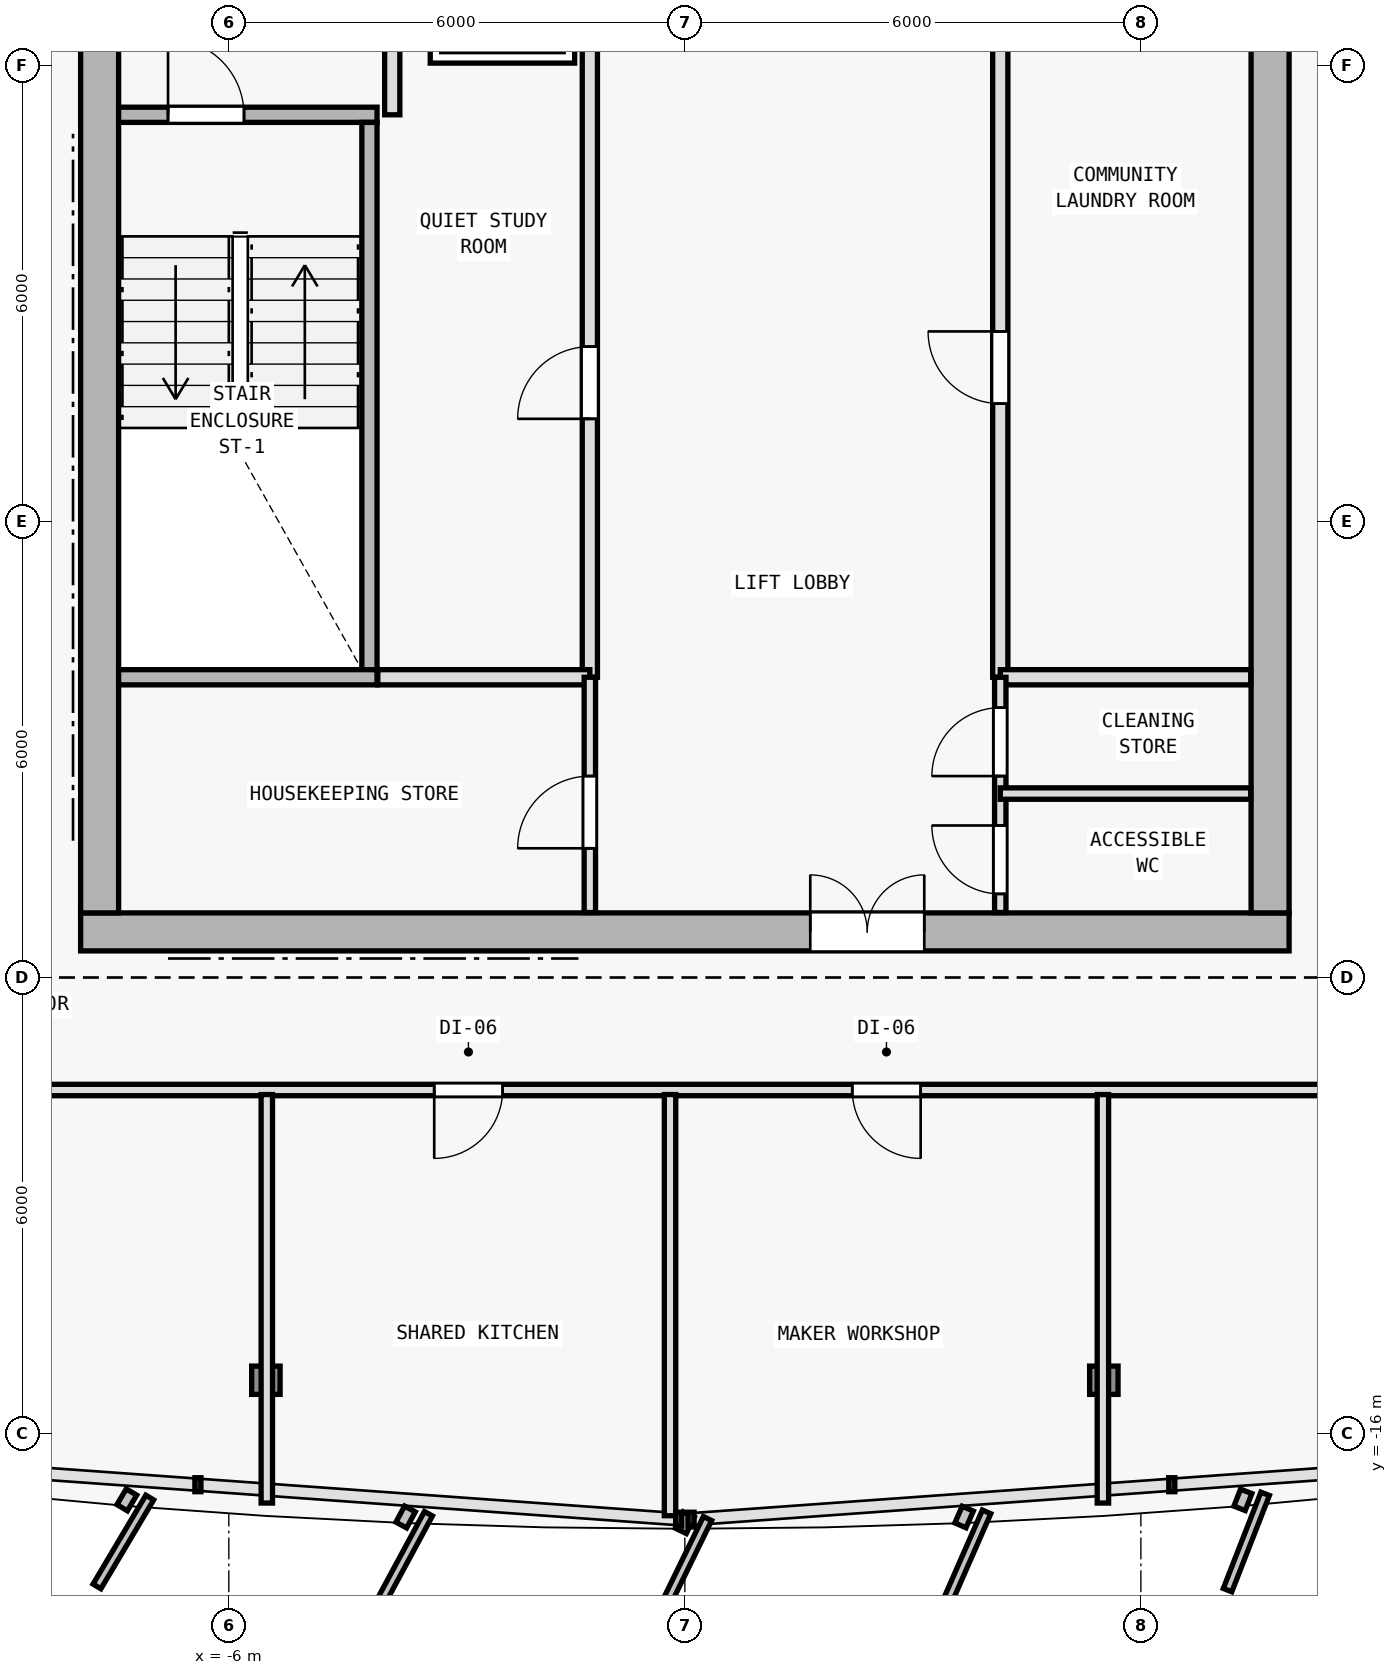
"""IFC4 building model, lengths in metres.
Left out: names, types, materials, properties, quantities, classifications, styles, units other than length and angle.
Written with IfcOpenShell. Run it as: python <this file> out.ifc"""

import sys

from ifc_helpers import new_model, si_unit, direction, frame, frame_2d, origin, origin_2d, place, context, subcontext, project, spatial, rectangle, i_section, extrude, element, fill, save


model = new_model("IFC4")
c1 = context("Model", 3, precision=1e-05, world=origin(), true_north=direction((0.0, 1.0)))
c2 = subcontext(c1, "Body", "Model", "MODEL_VIEW")
j1 = project(units=[si_unit("LENGTHUNIT", "METRE"), si_unit("PLANEANGLEUNIT", "RADIAN")], contexts=[c1])
p1 = place(None, origin())
s1 = spatial("IfcSite", under=j1, at=p1, CompositionType="ELEMENT")
p2 = place(p1, origin())
s2 = spatial("IfcBuilding", under=s1, at=p2, CompositionType="ELEMENT")
p3 = place(p2, frame((0.0, 0.0, 223.5)))
s3 = spatial("IfcBuildingStorey", under=s2, at=p3, CompositionType="ELEMENT", Elevation=223.5)
for number, where, z_axis, x_axis in (
    (1, (-7.7, -9.4, 0.0), (0.0, 0.0, 1.0), (1.0, 0.0, 0.0)),
    (2, (7.7, -9.4, 0.0), (0.0, 0.0, 1.0), (1.0, 0.0, 0.0)),
    (3, (0.0, -9.4, 0.0), (0.0, 0.0, 1.0), (1.0, 0.0, 0.0)),
    (4, (7.7, 0.4, 0.0), (0.0, 0.0, 1.0), (1.0, 0.0, 0.0)),
    (5, (-7.7, 2.0, 0.0), (0.0, 0.0, 1.0), (1.0, 0.0, 0.0)),
):
    element("IfcColumn", number, at=place(p3, frame(where, z_axis=z_axis, x_axis=x_axis)), inside=s3, PredefinedType="COLUMN", context=c2, shape_type="SweptSolid", body=[
        extrude(i_section(OverallWidth=0.398, OverallDepth=0.387, WebThickness=0.013, FlangeThickness=0.022, FilletRadius=0.015, at=origin_2d()), origin(), (0.0, 0.0, 1.0), 3.6),
    ])
for number, where, z_axis, x_axis in (
    (6, (-5.513, -15.298, 0.006), (0.007, 0.035, 0.999), (-0.981, 0.193, 0.0)),
    (7, (5.513, -15.298, 0.006), (-0.007, 0.035, 0.999), (-0.981, -0.193, 0.0)),
):
    element("IfcColumn", number, at=place(p3, frame(where, z_axis=z_axis, x_axis=x_axis)), inside=s3, PredefinedType="COLUMN", context=c2, shape_type="SweptSolid", body=[
        extrude(i_section(OverallWidth=0.374, OverallDepth=0.372, WebThickness=0.012, FlangeThickness=0.02, FilletRadius=0.015, at=origin_2d()), origin(), (0.0, 0.0, 1.0), 3.591),
    ])
p4 = place(p3, frame((-7.95, -9.4, 0.0), z_axis=(0.0, 0.0, 1.0), x_axis=(1.0, 0.0, 0.0)))
e8 = element("IfcWall", 8, at=p4, inside=s3, PredefinedType="SHEAR", context=c2, shape_type="SweptSolid", body=[
    extrude(rectangle(XDim=15.9, YDim=0.5, at=frame_2d((7.95, 0.0))), origin(), (0.0, 0.0, 1.0), 3.35),
])
p5 = place(p4, frame((9.6, 0.0, 0.0)))
e9 = element("IfcOpeningElement", 9, at=p5, cuts=e8, PredefinedType="OPENING", context=c2, shape_type="SweptSolid", body=[
    extrude(rectangle(XDim=1.5, YDim=2.2, at=frame_2d((0.75, 1.1))), frame((0.0, 0.26, 0.0), z_axis=(0.0, -1.0, 0.0), x_axis=(1.0, 0.0, 0.0)), (0.0, 0.0, 1.0), 0.52),
])
p6 = place(p3, frame((-7.7, -9.15, 0.0), z_axis=(0.0, 0.0, 1.0), x_axis=(0.0, 1.0, 0.0)))
e10 = element("IfcWall", 10, at=p6, inside=s3, PredefinedType="SHEAR", context=c2, shape_type="SweptSolid", body=[
    extrude(rectangle(XDim=19.1, YDim=0.5, at=frame_2d((9.55, 0.0))), origin(), (0.0, 0.0, 1.0), 3.35),
])
p7 = place(p6, frame((12.7, 0.0, 0.0)))
e11 = element("IfcOpeningElement", 11, at=p7, cuts=e10, PredefinedType="OPENING", context=c2, shape_type="SweptSolid", body=[
    extrude(rectangle(XDim=1.1, YDim=2.15, at=frame_2d((0.55, 1.075))), frame((0.0, 0.26, 0.0), z_axis=(0.0, -1.0, 0.0), x_axis=(1.0, 0.0, 0.0)), (0.0, 0.0, 1.0), 0.52),
])
p8 = place(p3, frame((7.7, 9.95, 0.0), z_axis=(0.0, 0.0, 1.0), x_axis=(0.0, -1.0, 0.0)))
e12 = element("IfcWall", 12, at=p8, inside=s3, PredefinedType="SHEAR", context=c2, shape_type="SweptSolid", body=[
    extrude(rectangle(XDim=19.1, YDim=0.5, at=frame_2d((9.55, 0.0))), origin(), (0.0, 0.0, 1.0), 3.35),
])
p9 = place(p3, frame((-7.45, 1.35, 0.0), z_axis=(0.0, 0.0, 1.0), x_axis=(1.0, 0.0, 0.0)))
e13 = element("IfcWall", 13, at=p9, inside=s3, PredefinedType="SOLIDWALL", context=c2, shape_type="SweptSolid", body=[
    extrude(rectangle(XDim=3.4, YDim=0.2, at=frame_2d((1.7, 0.0))), origin(), (0.0, 0.0, 1.0), 3.35),
])
p10 = place(p9, frame((0.65, 0.0, 0.0)))
e14 = element("IfcOpeningElement", 14, at=p10, cuts=e13, PredefinedType="OPENING", context=c2, shape_type="SweptSolid", body=[
    extrude(rectangle(XDim=1.0, YDim=2.15, at=frame_2d((0.5, 1.075))), frame((0.0, 0.11, 0.0), z_axis=(0.0, -1.0, 0.0), x_axis=(1.0, 0.0, 0.0)), (0.0, 0.0, 1.0), 0.22),
])
p11 = place(p3, frame((-4.15, -5.95, 0.0), z_axis=(0.0, 0.0, 1.0), x_axis=(0.0, 1.0, 0.0)))
e15 = element("IfcWall", 15, at=p11, inside=s3, PredefinedType="SOLIDWALL", context=c2, shape_type="SweptSolid", body=[
    extrude(rectangle(XDim=7.2, YDim=0.2, at=frame_2d((3.6, 0.0))), origin(), (0.0, 0.0, 1.0), 3.35),
])
p12 = place(p3, frame((-3.85, 1.35, 0.0), z_axis=(0.0, 0.0, 1.0), x_axis=(0.0, 1.0, 0.0)))
e16 = element("IfcWall", 16, at=p12, inside=s3, PredefinedType="SOLIDWALL", context=c2, shape_type="SweptSolid", body=[
    extrude(rectangle(XDim=8.595, YDim=0.2, at=frame_2d((4.297, 0.0))), origin(), (0.0, 0.0, 1.0), 3.35),
])
p13 = place(p12, frame((1.5, 0.0, 0.0)))
e17 = element("IfcOpeningElement", 17, at=p13, cuts=e16, PredefinedType="OPENING", context=c2, shape_type="SweptSolid", body=[
    extrude(rectangle(XDim=1.0, YDim=2.15, at=frame_2d((0.5, 1.075))), frame((0.0, 0.11, 0.0), z_axis=(0.0, -1.0, 0.0), x_axis=(1.0, 0.0, 0.0)), (0.0, 0.0, 1.0), 0.22),
])
p14 = place(p12, frame((3.18, 0.0, 0.0)))
e18 = element("IfcOpeningElement", 18, at=p14, cuts=e16, PredefinedType="OPENING", context=c2, shape_type="SweptSolid", body=[
    extrude(rectangle(XDim=1.0, YDim=2.15, at=frame_2d((0.5, 1.075))), frame((0.0, 0.11, 0.0), z_axis=(0.0, -1.0, 0.0), x_axis=(1.0, 0.0, 0.0)), (0.0, 0.0, 1.0), 0.22),
])
p15 = place(p3, frame((4.15, -6.05, 0.0), z_axis=(0.0, 0.0, 1.0), x_axis=(0.0, 1.0, 0.0)))
e19 = element("IfcWall", 19, at=p15, inside=s3, PredefinedType="SOLIDWALL", context=c2, shape_type="SweptSolid", body=[
    extrude(rectangle(XDim=8.7, YDim=0.2, at=frame_2d((4.35, 0.0))), origin(), (0.0, 0.0, 1.0), 3.35),
])
p16 = place(p15, frame((3.6, 0.0, 0.0)))
e20 = element("IfcOpeningElement", 20, at=p16, cuts=e19, PredefinedType="OPENING", context=c2, shape_type="SweptSolid", body=[
    extrude(rectangle(XDim=0.95, YDim=2.1, at=frame_2d((0.475, 1.05))), frame((0.0, 0.11, 0.0), z_axis=(0.0, -1.0, 0.0), x_axis=(1.0, 0.0, 0.0)), (0.0, 0.0, 1.0), 0.22),
])
p17 = place(p3, frame((-1.25, -6.05, 0.0), z_axis=(0.0, 0.0, 1.0), x_axis=(0.0, 1.0, 0.0)))
e21 = element("IfcWall", 21, at=p17, inside=s3, PredefinedType="SOLIDWALL", context=c2, shape_type="SweptSolid", body=[
    extrude(rectangle(XDim=8.7, YDim=0.2, at=frame_2d((4.35, 0.0))), origin(), (0.0, 0.0, 1.0), 3.35),
])
p18 = place(p17, frame((3.4, 0.0, 0.0)))
e22 = element("IfcOpeningElement", 22, at=p18, cuts=e21, PredefinedType="OPENING", context=c2, shape_type="SweptSolid", body=[
    extrude(rectangle(XDim=0.95, YDim=2.1, at=frame_2d((0.475, 1.05))), frame((0.0, 0.11, 0.0), z_axis=(0.0, -1.0, 0.0), x_axis=(1.0, 0.0, 0.0)), (0.0, 0.0, 1.0), 0.22),
])
p19 = place(p3, frame((-7.45, -6.05, 0.0), z_axis=(0.0, 0.0, 1.0), x_axis=(1.0, 0.0, 0.0)))
e23 = element("IfcWall", 23, at=p19, inside=s3, PredefinedType="SOLIDWALL", context=c2, shape_type="SweptSolid", body=[
    extrude(rectangle(XDim=3.4, YDim=0.2, at=frame_2d((1.7, 0.0))), origin(), (0.0, 0.0, 1.0), 3.35),
])
p20 = place(p3, frame((-4.04, -6.05, 0.0), z_axis=(0.0, 0.0, 1.0), x_axis=(1.0, 0.0, 0.0)))
e24 = element("IfcWall", 24, at=p20, inside=s3, PredefinedType="SOLIDWALL", context=c2, shape_type="SweptSolid", body=[
    extrude(rectangle(XDim=2.79, YDim=0.2, at=frame_2d((1.395, 0.0))), origin(), (0.0, 0.0, 1.0), 3.35),
])
p21 = place(p3, frame((4.15, -6.05, 0.0), z_axis=(0.0, 0.0, 1.0), x_axis=(1.0, 0.0, 0.0)))
e25 = element("IfcWall", 25, at=p21, inside=s3, PredefinedType="SOLIDWALL", context=c2, shape_type="SweptSolid", body=[
    extrude(rectangle(XDim=3.295, YDim=0.2, at=frame_2d((1.647, 0.0))), origin(), (0.0, 0.0, 1.0), 3.35),
])
p22 = place(p3, frame((-1.25, -9.145, 0.0), z_axis=(0.0, 0.0, 1.0), x_axis=(0.0, 1.0, 0.0)))
e26 = element("IfcWall", 26, at=p22, inside=s3, PredefinedType="PARTITIONING", context=c2, shape_type="SweptSolid", body=[
    extrude(rectangle(XDim=3.095, YDim=0.15, at=frame_2d((1.547, 0.0))), origin(), (0.0, 0.0, 1.0), 3.35),
])
p23 = place(p22, frame((0.845, 0.0, 0.0)))
e27 = element("IfcOpeningElement", 27, at=p23, cuts=e26, PredefinedType="OPENING", context=c2, shape_type="SweptSolid", body=[
    extrude(rectangle(XDim=0.95, YDim=2.1, at=frame_2d((0.475, 1.05))), frame((0.0, 0.085, 0.0), z_axis=(0.0, -1.0, 0.0), x_axis=(1.0, 0.0, 0.0)), (0.0, 0.0, 1.0), 0.17),
])
p24 = place(p3, frame((4.15, -9.145, 0.0), z_axis=(0.0, 0.0, 1.0), x_axis=(0.0, 1.0, 0.0)))
e28 = element("IfcWall", 28, at=p24, inside=s3, PredefinedType="PARTITIONING", context=c2, shape_type="SweptSolid", body=[
    extrude(rectangle(XDim=3.095, YDim=0.15, at=frame_2d((1.547, 0.0))), origin(), (0.0, 0.0, 1.0), 3.35),
])
p25 = place(p24, frame((0.245, 0.0, 0.0)))
e29 = element("IfcOpeningElement", 29, at=p25, cuts=e28, PredefinedType="OPENING", context=c2, shape_type="SweptSolid", body=[
    extrude(rectangle(XDim=0.9, YDim=2.1, at=frame_2d((0.45, 1.05))), frame((0.0, 0.085, 0.0), z_axis=(0.0, -1.0, 0.0), x_axis=(1.0, 0.0, 0.0)), (0.0, 0.0, 1.0), 0.17),
])
p26 = place(p24, frame((1.795, 0.0, 0.0)))
e30 = element("IfcOpeningElement", 30, at=p26, cuts=e28, PredefinedType="OPENING", context=c2, shape_type="SweptSolid", body=[
    extrude(rectangle(XDim=0.9, YDim=2.1, at=frame_2d((0.45, 1.05))), frame((0.0, 0.085, 0.0), z_axis=(0.0, -1.0, 0.0), x_axis=(1.0, 0.0, 0.0)), (0.0, 0.0, 1.0), 0.17),
])
p27 = place(p3, frame((4.15, -7.58, 0.0), z_axis=(0.0, 0.0, 1.0), x_axis=(1.0, 0.0, 0.0)))
e31 = element("IfcWall", 31, at=p27, inside=s3, PredefinedType="PARTITIONING", context=c2, shape_type="SweptSolid", body=[
    extrude(rectangle(XDim=3.295, YDim=0.15, at=frame_2d((1.647, 0.0))), origin(), (0.0, 0.0, 1.0), 3.35),
])
p28 = place(p3, frame((9.78, -11.48, 0.0), z_axis=(0.0, 0.0, 1.0), x_axis=(-1.0, 0.0, 0.0)))
e32 = element("IfcWall", 32, at=p28, inside=s3, PredefinedType="PARTITIONING", context=c2, shape_type="SweptSolid", body=[
    extrude(rectangle(XDim=19.56, YDim=0.15, at=frame_2d((9.78, 0.0))), origin(), (0.0, 0.0, 1.0), 3.005),
])
p29 = place(p28, frame((12.177, 0.0, 0.0)))
e33 = element("IfcOpeningElement", 33, at=p29, cuts=e32, PredefinedType="OPENING", context=c2, shape_type="SweptSolid", body=[
    extrude(rectangle(XDim=0.9, YDim=2.1, at=frame_2d((0.45, 1.05))), frame((0.0, 0.085, 0.0), z_axis=(0.0, -1.0, 0.0), x_axis=(1.0, 0.0, 0.0)), (0.0, 0.0, 1.0), 0.17),
])
p30 = place(p28, frame((6.677, 0.0, 0.0)))
e34 = element("IfcOpeningElement", 34, at=p30, cuts=e32, PredefinedType="OPENING", context=c2, shape_type="SweptSolid", body=[
    extrude(rectangle(XDim=0.9, YDim=2.1, at=frame_2d((0.45, 1.05))), frame((0.0, 0.085, 0.0), z_axis=(0.0, -1.0, 0.0), x_axis=(1.0, 0.0, 0.0)), (0.0, 0.0, 1.0), 0.17),
])
p31 = place(p3, frame((-5.5, -11.54, 0.0), z_axis=(0.0, 0.0, 1.0), x_axis=(0.0, -1.0, 0.0)))
e35 = element("IfcWall", 35, at=p31, inside=s3, PredefinedType="PARTITIONING", context=c2, shape_type="SweptSolid", body=[
    extrude(rectangle(XDim=5.374, YDim=0.15, at=frame_2d((2.687, 0.0))), origin(), (0.0, 0.0, 1.0), 2.775),
])
p32 = place(p3, frame((5.5, -11.54, 0.0), z_axis=(0.0, 0.0, 1.0), x_axis=(0.0, -1.0, 0.0)))
e36 = element("IfcWall", 36, at=p32, inside=s3, PredefinedType="PARTITIONING", context=c2, shape_type="SweptSolid", body=[
    extrude(rectangle(XDim=5.374, YDim=0.15, at=frame_2d((2.687, 0.0))), origin(), (0.0, 0.0, 1.0), 2.725),
])
p33 = place(p3, frame((-0.195, -11.54, 0.0), z_axis=(0.0, 0.0, 1.0), x_axis=(0.0, -1.0, 0.0)))
e37 = element("IfcWall", 37, at=p33, inside=s3, PredefinedType="PARTITIONING", context=c2, shape_type="SweptSolid", body=[
    extrude(rectangle(XDim=5.541, YDim=0.15, at=frame_2d((2.771, 0.0))), origin(), (0.0, 0.0, 1.0), 2.975),
])
p34 = place(p5, origin())
e38 = element("IfcDoor", 38, at=p34, inside=s3, OperationType="DOUBLE_DOOR_SINGLE_SWING", PredefinedType="DOOR", context=c2, shape_type="SweptSolid", body=[
    extrude(rectangle(XDim=1.5, YDim=2.2, at=frame_2d((0.75, 1.1))), frame((0.0, 0.025, 0.0), z_axis=(0.0, -1.0, 0.0), x_axis=(1.0, 0.0, 0.0)), (0.0, 0.0, 1.0), 0.05),
])
fill(e9, e38)
p35 = place(p10, origin())
e39 = element("IfcDoor", 39, at=p35, inside=s3, OperationType="SINGLE_SWING_LEFT", PredefinedType="DOOR", context=c2, shape_type="SweptSolid", body=[
    extrude(rectangle(XDim=1.0, YDim=2.15, at=frame_2d((0.5, 1.075))), frame((0.0, 0.025, 0.0), z_axis=(0.0, -1.0, 0.0), x_axis=(1.0, 0.0, 0.0)), (0.0, 0.0, 1.0), 0.05),
])
fill(e14, e39)
p36 = place(p16, origin())
e40 = element("IfcDoor", 40, at=p36, inside=s3, OperationType="SINGLE_SWING_RIGHT", PredefinedType="DOOR", context=c2, shape_type="SweptSolid", body=[
    extrude(rectangle(XDim=0.95, YDim=2.1, at=frame_2d((0.475, 1.05))), frame((0.0, 0.025, 0.0), z_axis=(0.0, -1.0, 0.0), x_axis=(1.0, 0.0, 0.0)), (0.0, 0.0, 1.0), 0.05),
])
fill(e20, e40)
p37 = place(p18, origin())
e41 = element("IfcDoor", 41, at=p37, inside=s3, OperationType="SINGLE_SWING_LEFT", PredefinedType="DOOR", context=c2, shape_type="SweptSolid", body=[
    extrude(rectangle(XDim=0.95, YDim=2.1, at=frame_2d((0.475, 1.05))), frame((0.0, 0.025, 0.0), z_axis=(0.0, -1.0, 0.0), x_axis=(1.0, 0.0, 0.0)), (0.0, 0.0, 1.0), 0.05),
])
fill(e22, e41)
p38 = place(p23, origin())
e42 = element("IfcDoor", 42, at=p38, inside=s3, OperationType="SINGLE_SWING_LEFT", PredefinedType="DOOR", context=c2, shape_type="SweptSolid", body=[
    extrude(rectangle(XDim=0.95, YDim=2.1, at=frame_2d((0.475, 1.05))), frame((0.0, 0.025, 0.0), z_axis=(0.0, -1.0, 0.0), x_axis=(1.0, 0.0, 0.0)), (0.0, 0.0, 1.0), 0.05),
])
fill(e27, e42)
p39 = place(p25, origin())
e43 = element("IfcDoor", 43, at=p39, inside=s3, OperationType="SINGLE_SWING_RIGHT", PredefinedType="DOOR", context=c2, shape_type="SweptSolid", body=[
    extrude(rectangle(XDim=0.9, YDim=2.1, at=frame_2d((0.45, 1.05))), frame((0.0, 0.025, 0.0), z_axis=(0.0, -1.0, 0.0), x_axis=(1.0, 0.0, 0.0)), (0.0, 0.0, 1.0), 0.05),
])
fill(e29, e43)
p40 = place(p26, origin())
e44 = element("IfcDoor", 44, at=p40, inside=s3, OperationType="SINGLE_SWING_LEFT", PredefinedType="DOOR", context=c2, shape_type="SweptSolid", body=[
    extrude(rectangle(XDim=0.9, YDim=2.1, at=frame_2d((0.45, 1.05))), frame((0.0, 0.025, 0.0), z_axis=(0.0, -1.0, 0.0), x_axis=(1.0, 0.0, 0.0)), (0.0, 0.0, 1.0), 0.05),
])
fill(e30, e44)
p41 = place(p29, origin())
e45 = element("IfcDoor", 45, at=p41, inside=s3, OperationType="SINGLE_SWING_RIGHT", PredefinedType="DOOR", context=c2, shape_type="SweptSolid", body=[
    extrude(rectangle(XDim=0.9, YDim=2.1, at=frame_2d((0.45, 1.05))), frame((0.0, 0.025, 0.0), z_axis=(0.0, -1.0, 0.0), x_axis=(1.0, 0.0, 0.0)), (0.0, 0.0, 1.0), 0.05),
])
fill(e33, e45)
p42 = place(p30, origin())
e46 = element("IfcDoor", 46, at=p42, inside=s3, OperationType="SINGLE_SWING_LEFT", PredefinedType="DOOR", context=c2, shape_type="SweptSolid", body=[
    extrude(rectangle(XDim=0.9, YDim=2.1, at=frame_2d((0.45, 1.05))), frame((0.0, 0.025, 0.0), z_axis=(0.0, -1.0, 0.0), x_axis=(1.0, 0.0, 0.0)), (0.0, 0.0, 1.0), 0.05),
])
fill(e34, e46)
save(model, sys.argv[1])
